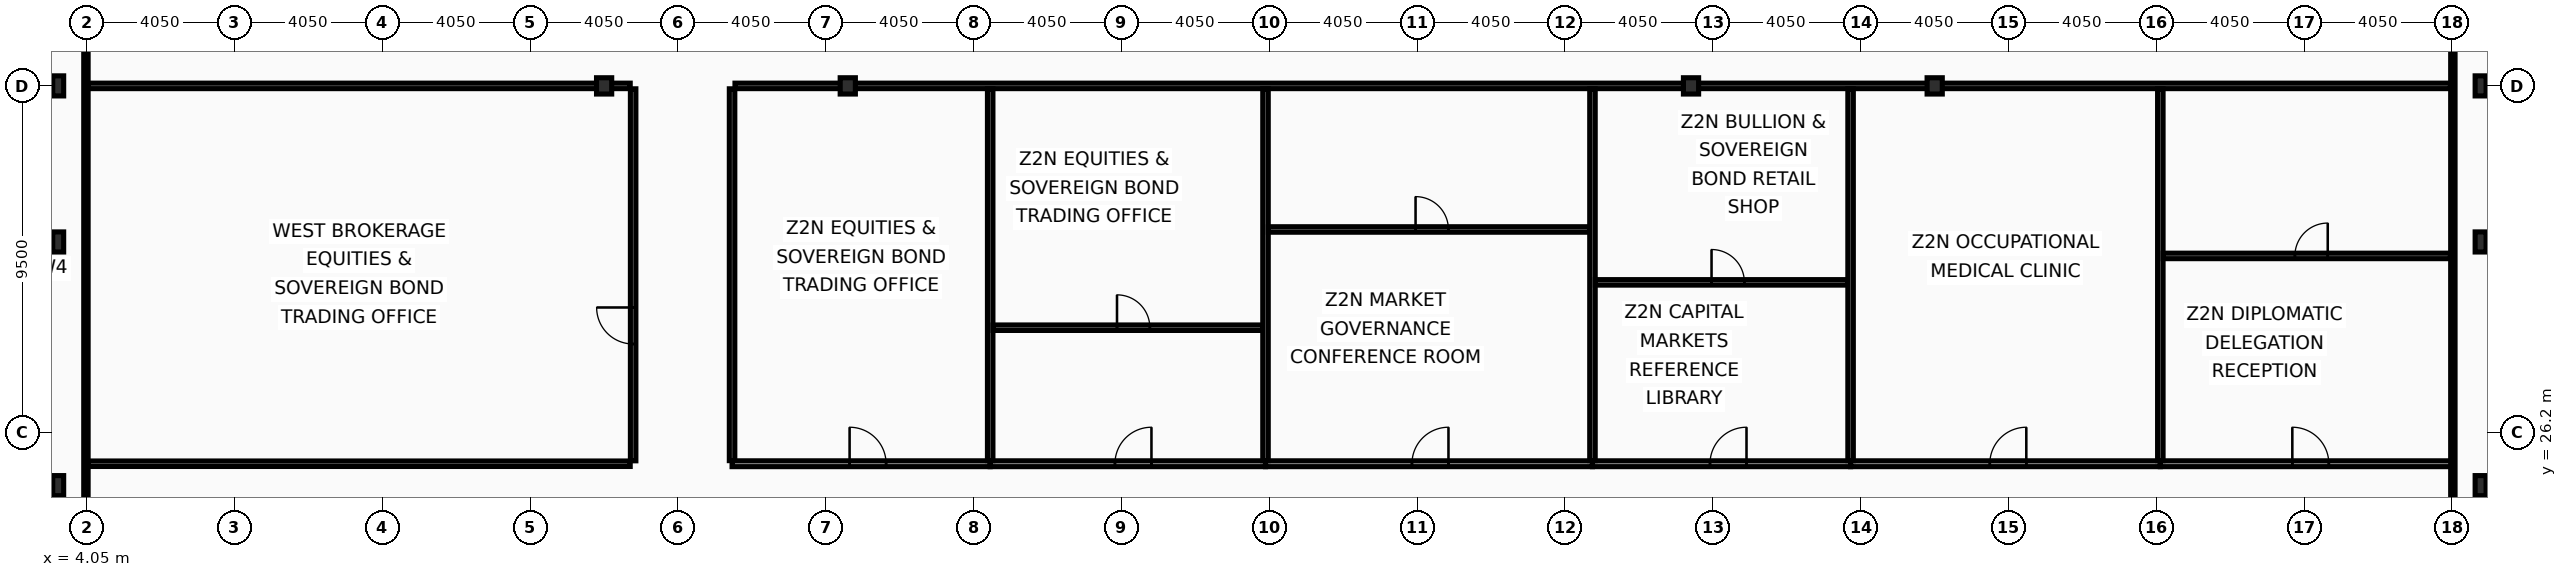
"""IFC4 building model, lengths in metres.
Left out: names, types, materials, properties, quantities, classifications, styles, units other than length and angle.
Written with IfcOpenShell. Run it as: python <this file> out.ifc"""

import sys

from ifc_helpers import new_model, si_unit, direction, frame, frame_2d, origin, origin_2d, place, context, subcontext, project, spatial, rectangle, i_section, extrude, element, fill, save


model = new_model("IFC4")
c1 = context("Model", 3, precision=1e-05, world=origin(), true_north=direction((0.0, 1.0)))
c2 = subcontext(c1, "Body", "Model", "MODEL_VIEW")
j1 = project(units=[si_unit("LENGTHUNIT", "METRE"), si_unit("PLANEANGLEUNIT", "RADIAN")], contexts=[c1])
p1 = place(None, origin())
s1 = spatial("IfcSite", under=j1, at=p1, CompositionType="ELEMENT")
p2 = place(p1, origin())
s2 = spatial("IfcBuilding", under=s1, at=p2, CompositionType="ELEMENT")
p3 = place(p2, frame((0.0, 0.0, 132.6)))
s3 = spatial("IfcBuildingStorey", under=s2, at=p3, CompositionType="ELEMENT", Elevation=132.6)
for number, where, z_axis, x_axis in (
    (1, (3.27, 24.75, 0.0), (0.0, 0.0, 1.0), (1.0, 0.0, 0.0)),
    (2, (3.27, 31.425, 0.0), (0.0, 0.0, 1.0), (1.0, 0.0, 0.0)),
    (3, (3.27, 35.7, 0.0), (0.0, 0.0, 1.0), (1.0, 0.0, 0.0)),
    (4, (69.63, 24.75, 0.0), (0.0, 0.0, 1.0), (1.0, 0.0, 0.0)),
    (5, (69.63, 31.425, 0.0), (0.0, 0.0, 1.0), (1.0, 0.0, 0.0)),
    (6, (69.63, 35.7, 0.0), (0.0, 0.0, 1.0), (1.0, 0.0, 0.0)),
):
    element("IfcColumn", number, at=place(p3, frame(where, z_axis=z_axis, x_axis=x_axis)), inside=s3, PredefinedType="COLUMN", context=c2, shape_type="SweptSolid", body=[
        extrude(i_section(OverallWidth=0.3, OverallDepth=0.55, WebThickness=0.015, FlangeThickness=0.029, at=origin_2d()), origin(), (0.0, 0.0, 1.0), 3.6),
    ])
for number, where, z_axis, x_axis in (
    (7, (18.225, 35.7, 0.0), (0.0, 0.0, 1.0), (1.0, 0.0, 0.0)),
    (8, (24.9, 35.7, 0.0), (0.0, 0.0, 1.0), (1.0, 0.0, 0.0)),
    (9, (48.0, 35.7, 0.0), (0.0, 0.0, 1.0), (1.0, 0.0, 0.0)),
    (10, (54.675, 35.7, 0.0), (0.0, 0.0, 1.0), (1.0, 0.0, 0.0)),
):
    element("IfcColumn", number, at=place(p3, frame(where, z_axis=z_axis, x_axis=x_axis)), inside=s3, PredefinedType="COLUMN", context=c2, shape_type="SweptSolid", body=[
        extrude(i_section(OverallWidth=0.416, OverallDepth=0.446, WebThickness=0.039, FlangeThickness=0.063, at=origin_2d()), origin(), (0.0, 0.0, 1.0), 3.6),
    ])
p4 = place(p3, frame((19.02, 25.43, 0.0), z_axis=(0.0, 0.0, 1.0), x_axis=(0.0, 1.0, 0.0)))
e11 = element("IfcWall", 11, at=p4, inside=s3, PredefinedType="PARTITIONING", context=c2, shape_type="SweptSolid", body=[
    extrude(rectangle(XDim=10.19, YDim=0.15, at=frame_2d((5.095, 0.0))), origin(), (0.0, 0.0, 1.0), 2.93),
])
p5 = place(p4, frame((3.2, 0.0, 0.0)))
e12 = element("IfcOpeningElement", 12, at=p5, cuts=e11, PredefinedType="OPENING", context=c2, shape_type="SweptSolid", body=[
    extrude(rectangle(XDim=1.0, YDim=2.05, at=frame_2d((0.5, 1.025))), frame((0.0, 0.085, 0.0), z_axis=(0.0, -1.0, 0.0), x_axis=(1.0, 0.0, 0.0)), (0.0, 0.0, 1.0), 0.17),
])
p6 = place(p3, frame((4.095, 25.35, 0.0), z_axis=(0.0, 0.0, 1.0), x_axis=(1.0, 0.0, 0.0)))
e13 = element("IfcWall", 13, at=p6, inside=s3, PredefinedType="PARTITIONING", context=c2, shape_type="SweptSolid", body=[
    extrude(rectangle(XDim=14.845, YDim=0.15, at=frame_2d((7.422, 0.0))), origin(), (0.0, 0.0, 1.0), 2.53),
])
p7 = place(p3, frame((4.095, 35.7, 0.0), z_axis=(0.0, 0.0, 1.0), x_axis=(1.0, 0.0, 0.0)))
e14 = element("IfcWall", 14, at=p7, inside=s3, PredefinedType="PARTITIONING", context=c2, shape_type="SweptSolid", body=[
    extrude(rectangle(XDim=14.845, YDim=0.15, at=frame_2d((7.422, 0.0))), origin(), (0.0, 0.0, 1.0), 2.09),
])
p8 = place(p3, frame((21.73, 25.435, 0.0), z_axis=(0.0, 0.0, 1.0), x_axis=(0.0, 1.0, 0.0)))
e15 = element("IfcWall", 15, at=p8, inside=s3, PredefinedType="PARTITIONING", context=c2, shape_type="SweptSolid", body=[
    extrude(rectangle(XDim=10.185, YDim=0.15, at=frame_2d((5.093, 0.0))), origin(), (0.0, 0.0, 1.0), 2.93),
])
p9 = place(p3, frame((21.81, 35.7, 0.0), z_axis=(0.0, 0.0, 1.0), x_axis=(1.0, 0.0, 0.0)))
e16 = element("IfcWall", 16, at=p9, inside=s3, PredefinedType="PARTITIONING", context=c2, shape_type="SweptSolid", body=[
    extrude(rectangle(XDim=46.995, YDim=0.15, at=frame_2d((23.498, 0.0))), origin(), (0.0, 0.0, 1.0), 2.09),
])
p10 = place(p3, frame((21.73, 25.35, 0.0), z_axis=(0.0, 0.0, 1.0), x_axis=(1.0, 0.0, 0.0)))
e17 = element("IfcWall", 17, at=p10, inside=s3, PredefinedType="PARTITIONING", context=c2, shape_type="SweptSolid", body=[
    extrude(rectangle(XDim=7.071, YDim=0.16, at=frame_2d((3.536, 0.0))), origin(), (0.0, 0.0, 1.0), 2.73),
])
p11 = place(p10, frame((3.22, 0.0, 0.0)))
e18 = element("IfcOpeningElement", 18, at=p11, cuts=e17, PredefinedType="OPENING", context=c2, shape_type="SweptSolid", body=[
    extrude(rectangle(XDim=1.0, YDim=2.05, at=frame_2d((0.5, 1.025))), frame((0.0, 0.09, 0.0), z_axis=(0.0, -1.0, 0.0), x_axis=(1.0, 0.0, 0.0)), (0.0, 0.0, 1.0), 0.18),
])
p12 = place(p3, frame((28.801, 25.35, 0.0), z_axis=(0.0, 0.0, 1.0), x_axis=(1.0, 0.0, 0.0)))
e19 = element("IfcWall", 19, at=p12, inside=s3, PredefinedType="PARTITIONING", context=c2, shape_type="SweptSolid", body=[
    extrude(rectangle(XDim=7.542, YDim=0.16, at=frame_2d((3.771, 0.0))), origin(), (0.0, 0.0, 1.0), 2.73),
])
p13 = place(p12, frame((3.418, 0.0, 0.0)))
e20 = element("IfcOpeningElement", 20, at=p13, cuts=e19, PredefinedType="OPENING", context=c2, shape_type="SweptSolid", body=[
    extrude(rectangle(XDim=1.0, YDim=2.05, at=frame_2d((0.5, 1.025))), frame((0.0, 0.09, 0.0), z_axis=(0.0, -1.0, 0.0), x_axis=(1.0, 0.0, 0.0)), (0.0, 0.0, 1.0), 0.18),
])
p14 = place(p3, frame((28.801, 25.435, 0.0), z_axis=(0.0, 0.0, 1.0), x_axis=(0.0, 1.0, 0.0)))
e21 = element("IfcWall", 21, at=p14, inside=s3, PredefinedType="PARTITIONING", context=c2, shape_type="SweptSolid", body=[
    extrude(rectangle(XDim=10.185, YDim=0.15, at=frame_2d((5.093, 0.0))), origin(), (0.0, 0.0, 1.0), 2.93),
])
p15 = place(p3, frame((28.881, 29.076, 0.0), z_axis=(0.0, 0.0, 1.0), x_axis=(1.0, 0.0, 0.0)))
e22 = element("IfcWall", 22, at=p15, inside=s3, PredefinedType="PARTITIONING", context=c2, shape_type="SweptSolid", body=[
    extrude(rectangle(XDim=7.382, YDim=0.15, at=frame_2d((3.691, 0.0))), origin(), (0.0, 0.0, 1.0), 2.73),
])
p16 = place(p15, frame((3.394, 0.0, 0.0)))
e23 = element("IfcOpeningElement", 23, at=p16, cuts=e22, PredefinedType="OPENING", context=c2, shape_type="SweptSolid", body=[
    extrude(rectangle(XDim=0.9, YDim=2.05, at=frame_2d((0.45, 1.025))), frame((0.0, 0.085, 0.0), z_axis=(0.0, -1.0, 0.0), x_axis=(1.0, 0.0, 0.0)), (0.0, 0.0, 1.0), 0.17),
])
p17 = place(p3, frame((36.344, 25.35, 0.0), z_axis=(0.0, 0.0, 1.0), x_axis=(1.0, 0.0, 0.0)))
e24 = element("IfcWall", 24, at=p17, inside=s3, PredefinedType="PARTITIONING", context=c2, shape_type="SweptSolid", body=[
    extrude(rectangle(XDim=8.957, YDim=0.16, at=frame_2d((4.478, 0.0))), origin(), (0.0, 0.0, 1.0), 2.73),
])
p18 = place(p17, frame((4.012, 0.0, 0.0)))
e25 = element("IfcOpeningElement", 25, at=p18, cuts=e24, PredefinedType="OPENING", context=c2, shape_type="SweptSolid", body=[
    extrude(rectangle(XDim=1.0, YDim=2.05, at=frame_2d((0.5, 1.025))), frame((0.0, 0.09, 0.0), z_axis=(0.0, -1.0, 0.0), x_axis=(1.0, 0.0, 0.0)), (0.0, 0.0, 1.0), 0.18),
])
p19 = place(p3, frame((36.344, 25.435, 0.0), z_axis=(0.0, 0.0, 1.0), x_axis=(0.0, 1.0, 0.0)))
e26 = element("IfcWall", 26, at=p19, inside=s3, PredefinedType="PARTITIONING", context=c2, shape_type="SweptSolid", body=[
    extrude(rectangle(XDim=10.185, YDim=0.15, at=frame_2d((5.093, 0.0))), origin(), (0.0, 0.0, 1.0), 2.93),
])
p20 = place(p3, frame((36.423, 31.767, 0.0), z_axis=(0.0, 0.0, 1.0), x_axis=(1.0, 0.0, 0.0)))
e27 = element("IfcWall", 27, at=p20, inside=s3, PredefinedType="PARTITIONING", context=c2, shape_type="SweptSolid", body=[
    extrude(rectangle(XDim=8.797, YDim=0.15, at=frame_2d((4.398, 0.0))), origin(), (0.0, 0.0, 1.0), 2.73),
])
p21 = place(p20, frame((4.031, 0.0, 0.0)))
e28 = element("IfcOpeningElement", 28, at=p21, cuts=e27, PredefinedType="OPENING", context=c2, shape_type="SweptSolid", body=[
    extrude(rectangle(XDim=0.9, YDim=2.05, at=frame_2d((0.45, 1.025))), frame((0.0, 0.085, 0.0), z_axis=(0.0, -1.0, 0.0), x_axis=(1.0, 0.0, 0.0)), (0.0, 0.0, 1.0), 0.17),
])
p22 = place(p3, frame((45.3, 25.35, 0.0), z_axis=(0.0, 0.0, 1.0), x_axis=(1.0, 0.0, 0.0)))
e29 = element("IfcWall", 29, at=p22, inside=s3, PredefinedType="PARTITIONING", context=c2, shape_type="SweptSolid", body=[
    extrude(rectangle(XDim=7.071, YDim=0.16, at=frame_2d((3.536, 0.0))), origin(), (0.0, 0.0, 1.0), 2.73),
])
p23 = place(p22, frame((3.22, 0.0, 0.0)))
e30 = element("IfcOpeningElement", 30, at=p23, cuts=e29, PredefinedType="OPENING", context=c2, shape_type="SweptSolid", body=[
    extrude(rectangle(XDim=1.0, YDim=2.05, at=frame_2d((0.5, 1.025))), frame((0.0, 0.09, 0.0), z_axis=(0.0, -1.0, 0.0), x_axis=(1.0, 0.0, 0.0)), (0.0, 0.0, 1.0), 0.18),
])
p24 = place(p3, frame((45.3, 25.435, 0.0), z_axis=(0.0, 0.0, 1.0), x_axis=(0.0, 1.0, 0.0)))
e31 = element("IfcWall", 31, at=p24, inside=s3, PredefinedType="PARTITIONING", context=c2, shape_type="SweptSolid", body=[
    extrude(rectangle(XDim=10.185, YDim=0.15, at=frame_2d((5.093, 0.0))), origin(), (0.0, 0.0, 1.0), 2.93),
])
p25 = place(p3, frame((45.38, 30.318, 0.0), z_axis=(0.0, 0.0, 1.0), x_axis=(1.0, 0.0, 0.0)))
e32 = element("IfcWall", 32, at=p25, inside=s3, PredefinedType="PARTITIONING", context=c2, shape_type="SweptSolid", body=[
    extrude(rectangle(XDim=6.911, YDim=0.15, at=frame_2d((3.456, 0.0))), origin(), (0.0, 0.0, 1.0), 2.73),
])
p26 = place(p25, frame((3.182, 0.0, 0.0)))
e33 = element("IfcOpeningElement", 33, at=p26, cuts=e32, PredefinedType="OPENING", context=c2, shape_type="SweptSolid", body=[
    extrude(rectangle(XDim=0.9, YDim=2.05, at=frame_2d((0.45, 1.025))), frame((0.0, 0.085, 0.0), z_axis=(0.0, -1.0, 0.0), x_axis=(1.0, 0.0, 0.0)), (0.0, 0.0, 1.0), 0.17),
])
p27 = place(p3, frame((52.371, 25.35, 0.0), z_axis=(0.0, 0.0, 1.0), x_axis=(1.0, 0.0, 0.0)))
e34 = element("IfcWall", 34, at=p27, inside=s3, PredefinedType="PARTITIONING", context=c2, shape_type="SweptSolid", body=[
    extrude(rectangle(XDim=8.485, YDim=0.16, at=frame_2d((4.243, 0.0))), origin(), (0.0, 0.0, 1.0), 2.53),
])
p28 = place(p27, frame((3.814, 0.0, 0.0)))
e35 = element("IfcOpeningElement", 35, at=p28, cuts=e34, PredefinedType="OPENING", context=c2, shape_type="SweptSolid", body=[
    extrude(rectangle(XDim=1.0, YDim=2.05, at=frame_2d((0.5, 1.025))), frame((0.0, 0.09, 0.0), z_axis=(0.0, -1.0, 0.0), x_axis=(1.0, 0.0, 0.0)), (0.0, 0.0, 1.0), 0.18),
])
p29 = place(p3, frame((52.371, 25.435, 0.0), z_axis=(0.0, 0.0, 1.0), x_axis=(0.0, 1.0, 0.0)))
e36 = element("IfcWall", 36, at=p29, inside=s3, PredefinedType="PARTITIONING", context=c2, shape_type="SweptSolid", body=[
    extrude(rectangle(XDim=10.185, YDim=0.15, at=frame_2d((5.093, 0.0))), origin(), (0.0, 0.0, 1.0), 2.93),
])
p30 = place(p3, frame((60.856, 25.35, 0.0), z_axis=(0.0, 0.0, 1.0), x_axis=(1.0, 0.0, 0.0)))
e37 = element("IfcWall", 37, at=p30, inside=s3, PredefinedType="PARTITIONING", context=c2, shape_type="SweptSolid", body=[
    extrude(rectangle(XDim=8.014, YDim=0.16, at=frame_2d((4.007, 0.0))), origin(), (0.0, 0.0, 1.0), 2.83),
])
p31 = place(p30, frame((3.616, 0.0, 0.0)))
e38 = element("IfcOpeningElement", 38, at=p31, cuts=e37, PredefinedType="OPENING", context=c2, shape_type="SweptSolid", body=[
    extrude(rectangle(XDim=1.0, YDim=2.05, at=frame_2d((0.5, 1.025))), frame((0.0, 0.09, 0.0), z_axis=(0.0, -1.0, 0.0), x_axis=(1.0, 0.0, 0.0)), (0.0, 0.0, 1.0), 0.18),
])
p32 = place(p3, frame((60.856, 25.435, 0.0), z_axis=(0.0, 0.0, 1.0), x_axis=(0.0, 1.0, 0.0)))
e39 = element("IfcWall", 39, at=p32, inside=s3, PredefinedType="PARTITIONING", context=c2, shape_type="SweptSolid", body=[
    extrude(rectangle(XDim=10.185, YDim=0.15, at=frame_2d((5.093, 0.0))), origin(), (0.0, 0.0, 1.0), 2.11),
])
p33 = place(p3, frame((60.936, 31.042, 0.0), z_axis=(0.0, 0.0, 1.0), x_axis=(1.0, 0.0, 0.0)))
e40 = element("IfcWall", 40, at=p33, inside=s3, PredefinedType="PARTITIONING", context=c2, shape_type="SweptSolid", body=[
    extrude(rectangle(XDim=7.869, YDim=0.15, at=frame_2d((3.934, 0.0))), origin(), (0.0, 0.0, 1.0), 2.09),
])
p34 = place(p33, frame((3.606, 0.0, 0.0)))
e41 = element("IfcOpeningElement", 41, at=p34, cuts=e40, PredefinedType="OPENING", context=c2, shape_type="SweptSolid", body=[
    extrude(rectangle(XDim=0.9, YDim=2.05, at=frame_2d((0.45, 1.025))), frame((0.0, 0.085, 0.0), z_axis=(0.0, -1.0, 0.0), x_axis=(1.0, 0.0, 0.0)), (0.0, 0.0, 1.0), 0.17),
])
for number, where, z_axis, x_axis in (
    (42, (4.03, 10.665, 0.0), (0.0, 0.0, 1.0), (0.0, 1.0, 0.0)),
    (43, (68.87, 10.665, 0.0), (0.0, 0.0, 1.0), (0.0, 1.0, 0.0)),
):
    element("IfcWall", number, at=place(p3, frame(where, z_axis=z_axis, x_axis=x_axis)), inside=s3, PredefinedType="PARTITIONING", context=c2, shape_type="SweptSolid", body=[
        extrude(rectangle(XDim=42.11, YDim=0.12, at=frame_2d((21.055, 0.0))), origin(), (0.0, 0.0, 1.0), 1.83),
    ])
p35 = place(p5, origin())
e44 = element("IfcDoor", 44, at=p35, inside=s3, OperationType="SINGLE_SWING_RIGHT", PredefinedType="DOOR", context=c2, shape_type="SweptSolid", body=[
    extrude(rectangle(XDim=1.0, YDim=2.05, at=frame_2d((0.5, 1.025))), frame((0.0, 0.025, 0.0), z_axis=(0.0, -1.0, 0.0), x_axis=(1.0, 0.0, 0.0)), (0.0, 0.0, 1.0), 0.05),
])
fill(e12, e44)
p36 = place(p11, origin())
e45 = element("IfcDoor", 45, at=p36, inside=s3, OperationType="SINGLE_SWING_LEFT", PredefinedType="DOOR", context=c2, shape_type="SweptSolid", body=[
    extrude(rectangle(XDim=1.0, YDim=2.05, at=frame_2d((0.5, 1.025))), frame((0.0, 0.025, 0.0), z_axis=(0.0, -1.0, 0.0), x_axis=(1.0, 0.0, 0.0)), (0.0, 0.0, 1.0), 0.05),
])
fill(e18, e45)
p37 = place(p13, origin())
e46 = element("IfcDoor", 46, at=p37, inside=s3, OperationType="SINGLE_SWING_RIGHT", PredefinedType="DOOR", context=c2, shape_type="SweptSolid", body=[
    extrude(rectangle(XDim=1.0, YDim=2.05, at=frame_2d((0.5, 1.025))), frame((0.0, 0.025, 0.0), z_axis=(0.0, -1.0, 0.0), x_axis=(1.0, 0.0, 0.0)), (0.0, 0.0, 1.0), 0.05),
])
fill(e20, e46)
p38 = place(p16, origin())
e47 = element("IfcDoor", 47, at=p38, inside=s3, OperationType="SINGLE_SWING_LEFT", PredefinedType="DOOR", context=c2, shape_type="SweptSolid", body=[
    extrude(rectangle(XDim=0.9, YDim=2.05, at=frame_2d((0.45, 1.025))), frame((0.0, 0.025, 0.0), z_axis=(0.0, -1.0, 0.0), x_axis=(1.0, 0.0, 0.0)), (0.0, 0.0, 1.0), 0.05),
])
fill(e23, e47)
p39 = place(p18, origin())
e48 = element("IfcDoor", 48, at=p39, inside=s3, OperationType="SINGLE_SWING_RIGHT", PredefinedType="DOOR", context=c2, shape_type="SweptSolid", body=[
    extrude(rectangle(XDim=1.0, YDim=2.05, at=frame_2d((0.5, 1.025))), frame((0.0, 0.025, 0.0), z_axis=(0.0, -1.0, 0.0), x_axis=(1.0, 0.0, 0.0)), (0.0, 0.0, 1.0), 0.05),
])
fill(e25, e48)
p40 = place(p21, origin())
e49 = element("IfcDoor", 49, at=p40, inside=s3, OperationType="SINGLE_SWING_LEFT", PredefinedType="DOOR", context=c2, shape_type="SweptSolid", body=[
    extrude(rectangle(XDim=0.9, YDim=2.05, at=frame_2d((0.45, 1.025))), frame((0.0, 0.025, 0.0), z_axis=(0.0, -1.0, 0.0), x_axis=(1.0, 0.0, 0.0)), (0.0, 0.0, 1.0), 0.05),
])
fill(e28, e49)
p41 = place(p23, origin())
e50 = element("IfcDoor", 50, at=p41, inside=s3, OperationType="SINGLE_SWING_RIGHT", PredefinedType="DOOR", context=c2, shape_type="SweptSolid", body=[
    extrude(rectangle(XDim=1.0, YDim=2.05, at=frame_2d((0.5, 1.025))), frame((0.0, 0.025, 0.0), z_axis=(0.0, -1.0, 0.0), x_axis=(1.0, 0.0, 0.0)), (0.0, 0.0, 1.0), 0.05),
])
fill(e30, e50)
p42 = place(p26, origin())
e51 = element("IfcDoor", 51, at=p42, inside=s3, OperationType="SINGLE_SWING_LEFT", PredefinedType="DOOR", context=c2, shape_type="SweptSolid", body=[
    extrude(rectangle(XDim=0.9, YDim=2.05, at=frame_2d((0.45, 1.025))), frame((0.0, 0.025, 0.0), z_axis=(0.0, -1.0, 0.0), x_axis=(1.0, 0.0, 0.0)), (0.0, 0.0, 1.0), 0.05),
])
fill(e33, e51)
p43 = place(p28, origin())
e52 = element("IfcDoor", 52, at=p43, inside=s3, OperationType="SINGLE_SWING_RIGHT", PredefinedType="DOOR", context=c2, shape_type="SweptSolid", body=[
    extrude(rectangle(XDim=1.0, YDim=2.05, at=frame_2d((0.5, 1.025))), frame((0.0, 0.025, 0.0), z_axis=(0.0, -1.0, 0.0), x_axis=(1.0, 0.0, 0.0)), (0.0, 0.0, 1.0), 0.05),
])
fill(e35, e52)
p44 = place(p31, origin())
e53 = element("IfcDoor", 53, at=p44, inside=s3, OperationType="SINGLE_SWING_LEFT", PredefinedType="DOOR", context=c2, shape_type="SweptSolid", body=[
    extrude(rectangle(XDim=1.0, YDim=2.05, at=frame_2d((0.5, 1.025))), frame((0.0, 0.025, 0.0), z_axis=(0.0, -1.0, 0.0), x_axis=(1.0, 0.0, 0.0)), (0.0, 0.0, 1.0), 0.05),
])
fill(e38, e53)
p45 = place(p34, origin())
e54 = element("IfcDoor", 54, at=p45, inside=s3, OperationType="SINGLE_SWING_RIGHT", PredefinedType="DOOR", context=c2, shape_type="SweptSolid", body=[
    extrude(rectangle(XDim=0.9, YDim=2.05, at=frame_2d((0.45, 1.025))), frame((0.0, 0.025, 0.0), z_axis=(0.0, -1.0, 0.0), x_axis=(1.0, 0.0, 0.0)), (0.0, 0.0, 1.0), 0.05),
])
fill(e41, e54)
save(model, sys.argv[1])
